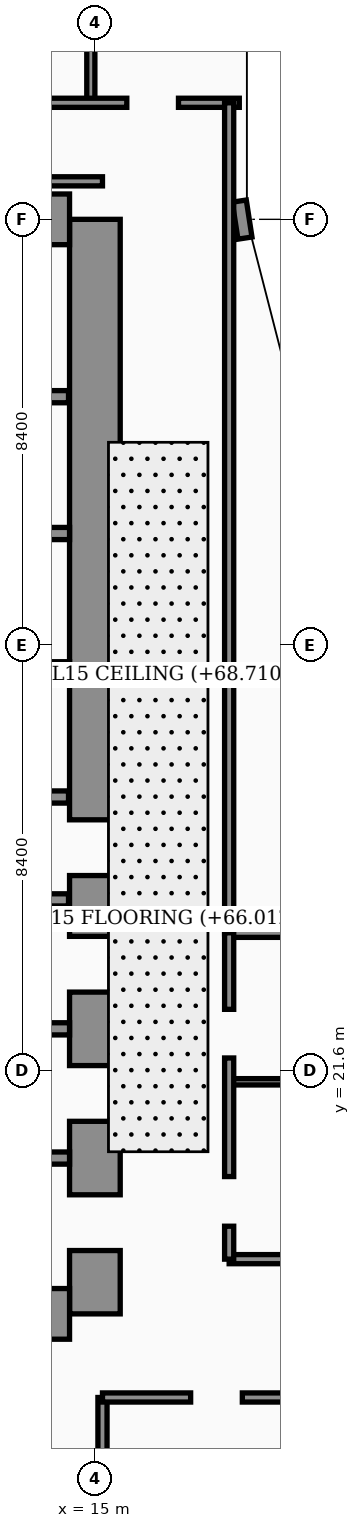
"""IFC4 building model, lengths in metres.
Left out: names, types, materials, properties, quantities, classifications, styles, units other than length and angle.
Written with IfcOpenShell. Run it as: python <this file> out.ifc"""

import sys

from ifc_helpers import new_model, si_unit, direction, frame, frame_2d, origin, place, context, subcontext, project, spatial, rectangle, extrude, element, fill, save


model = new_model("IFC4")
c1 = context("Model", 3, precision=1e-05, world=origin(), true_north=direction((0.0, 1.0)))
c2 = subcontext(c1, "Body", "Model", "MODEL_VIEW")
j1 = project(units=[si_unit("LENGTHUNIT", "METRE"), si_unit("PLANEANGLEUNIT", "RADIAN")], contexts=[c1])
p1 = place(None, origin())
s1 = spatial("IfcSite", under=j1, at=p1, CompositionType="ELEMENT")
p2 = place(p1, origin())
s2 = spatial("IfcBuilding", under=s1, at=p2, CompositionType="ELEMENT")
p3 = place(p2, frame((0.0, 0.0, 66.0)))
s3 = spatial("IfcBuildingStorey", under=s2, at=p3, CompositionType="ELEMENT", Elevation=66.0)
p4 = place(p3, frame((15.0, 16.8, 0.0), z_axis=(0.0, 0.0, 1.0), x_axis=(0.0, 1.0, 0.0)))
e1 = element("IfcWall", 1, at=p4, inside=s3, PredefinedType="SHEAR", context=c2, shape_type="SweptSolid", body=[
    extrude(rectangle(XDim=21.6, YDim=1.0, at=frame_2d((10.8, 0.0))), origin(), (0.0, 0.0, 1.0), 3.56),
])
p5 = place(p4, frame((8.65, 0.0, 0.0)))
e2 = element("IfcOpeningElement", 2, at=p5, cuts=e1, PredefinedType="OPENING", context=c2, shape_type="SweptSolid", body=[
    extrude(rectangle(XDim=1.1, YDim=2.2, at=frame_2d((0.55, 1.1))), frame((0.0, 0.51, 0.0), z_axis=(0.0, -1.0, 0.0), x_axis=(1.0, 0.0, 0.0)), (0.0, 0.0, 1.0), 1.02),
])
p6 = place(p4, frame((1.25, 0.0, 0.0)))
e3 = element("IfcOpeningElement", 3, at=p6, cuts=e1, PredefinedType="OPENING", context=c2, shape_type="SweptSolid", body=[
    extrude(rectangle(XDim=1.1, YDim=2.2, at=frame_2d((0.55, 1.1))), frame((0.0, 0.51, 0.0), z_axis=(0.0, -1.0, 0.0), x_axis=(1.0, 0.0, 0.0)), (0.0, 0.0, 1.0), 1.02),
])
p7 = place(p4, frame((3.8, 0.0, 0.0)))
e4 = element("IfcOpeningElement", 4, at=p7, cuts=e1, PredefinedType="OPENING", context=c2, shape_type="SweptSolid", body=[
    extrude(rectangle(XDim=1.1, YDim=2.2, at=frame_2d((0.55, 1.1))), frame((0.0, 0.51, 0.0), z_axis=(0.0, -1.0, 0.0), x_axis=(1.0, 0.0, 0.0)), (0.0, 0.0, 1.0), 1.02),
])
p8 = place(p4, frame((6.35, 0.0, 0.0)))
e5 = element("IfcOpeningElement", 5, at=p8, cuts=e1, PredefinedType="OPENING", context=c2, shape_type="SweptSolid", body=[
    extrude(rectangle(XDim=1.1, YDim=2.2, at=frame_2d((0.55, 1.1))), frame((0.0, 0.51, 0.0), z_axis=(0.0, -1.0, 0.0), x_axis=(1.0, 0.0, 0.0)), (0.0, 0.0, 1.0), 1.02),
])
for number, where, z_axis, x_axis in (
    (6, (4.7, 38.4, 0.0), (0.0, 0.0, 1.0), (1.0, 0.0, 0.0)),
    (7, (4.7, 16.8, 0.0), (0.0, 0.0, 1.0), (1.0, 0.0, 0.0)),
):
    element("IfcWall", number, at=place(p3, frame(where, z_axis=z_axis, x_axis=x_axis)), inside=s3, PredefinedType="SHEAR", context=c2, shape_type="SweptSolid", body=[
        extrude(rectangle(XDim=9.8, YDim=1.0, at=frame_2d((4.9, 0.0))), origin(), (0.0, 0.0, 1.0), 3.56),
    ])
for number, where, z_axis, x_axis in (
    (8, (12.18, 19.875, 0.0), (0.0, 0.0, 1.0), (1.0, 0.0, 0.0)),
    (9, (12.18, 22.425, 0.0), (0.0, 0.0, 1.0), (1.0, 0.0, 0.0)),
    (10, (12.18, 29.55, 0.0), (0.0, 0.0, 1.0), (1.0, 0.0, 0.0)),
    (11, (12.18, 32.2, 0.0), (0.0, 0.0, 1.0), (1.0, 0.0, 0.0)),
):
    element("IfcWall", number, at=place(p3, frame(where, z_axis=z_axis, x_axis=x_axis)), inside=s3, PredefinedType="SOLIDWALL", context=c2, shape_type="SweptSolid", body=[
        extrude(rectangle(XDim=2.32, YDim=0.24, at=frame_2d((1.16, 0.0))), origin(), (0.0, 0.0, 1.0), 3.56),
    ])
p9 = place(p3, frame((17.962, 38.03, 0.0), z_axis=(0.0, 0.0, 1.0), x_axis=(-0.15141125477, 0.988470855377, 0.0)))
e12 = element("IfcWall", 12, at=p9, inside=s3, PredefinedType="SOLIDWALL", context=c2, shape_type="SweptSolid", body=[
    extrude(rectangle(XDim=0.739, YDim=0.28, at=frame_2d((0.369, 0.0))), origin(), (0.0, 0.0, 1.0), 3.56),
])
p10 = place(p3, frame((12.15, 24.97, 0.0), z_axis=(0.0, 0.0, 1.0), x_axis=(1.0, 0.0, 0.0)))
e13 = element("IfcWall", 13, at=p10, inside=s3, PredefinedType="SOLIDWALL", context=c2, shape_type="SweptSolid", body=[
    extrude(rectangle(XDim=2.33, YDim=0.24, at=frame_2d((1.165, 0.0))), origin(), (0.0, 0.0, 1.0), 2.84),
])
p11 = place(p3, frame((12.25, 27.0, 0.0), z_axis=(0.0, 0.0, 1.0), x_axis=(1.0, 0.0, 0.0)))
e14 = element("IfcWall", 14, at=p11, inside=s3, PredefinedType="SOLIDWALL", context=c2, shape_type="SweptSolid", body=[
    extrude(rectangle(XDim=2.23, YDim=0.24, at=frame_2d((1.115, 0.0))), origin(), (0.0, 0.0, 1.0), 3.56),
])
p12 = place(p3, frame((9.66, 34.9, 0.0), z_axis=(0.0, 0.0, 1.0), x_axis=(1.0, 0.0, 0.0)))
e15 = element("IfcWall", 15, at=p12, inside=s3, PredefinedType="SOLIDWALL", context=c2, shape_type="SweptSolid", body=[
    extrude(rectangle(XDim=4.82, YDim=0.24, at=frame_2d((2.41, 0.0))), origin(), (0.0, 0.0, 1.0), 3.56),
])
p13 = place(p3, frame((15.15, 2.44, 0.0), z_axis=(0.0, 0.0, 1.0), x_axis=(0.0, 1.0, 0.0)))
e16 = element("IfcWall", 16, at=p13, inside=s3, PredefinedType="PARTITIONING", context=c2, shape_type="SweptSolid", body=[
    extrude(rectangle(XDim=12.71, YDim=0.18, at=frame_2d((6.355, 0.0))), origin(), (0.0, 0.0, 1.0), 3.04),
])
p14 = place(p3, frame((15.15, 15.15, 0.0), z_axis=(0.0, 0.0, 1.0), x_axis=(1.0, 0.0, 0.0)))
e17 = element("IfcWall", 17, at=p14, inside=s3, PredefinedType="PARTITIONING", context=c2, shape_type="SweptSolid", body=[
    extrude(rectangle(XDim=6.45, YDim=0.18, at=frame_2d((3.225, 0.0))), origin(), (0.0, 0.0, 1.0), 2.34),
])
p15 = place(p14, frame((1.74, 0.0, 0.0)))
e18 = element("IfcOpeningElement", 18, at=p15, cuts=e17, PredefinedType="OPENING", context=c2, shape_type="SweptSolid", body=[
    extrude(rectangle(XDim=1.02, YDim=2.2, at=frame_2d((0.51, 1.1))), frame((0.0, 0.1, 0.0), z_axis=(0.0, -1.0, 0.0), x_axis=(1.0, 0.0, 0.0)), (0.0, 0.0, 1.0), 0.2),
])
p16 = place(p3, frame((14.92, 40.7, 0.0), z_axis=(0.0, 0.0, 1.0), x_axis=(0.0, 1.0, 0.0)))
e19 = element("IfcWall", 19, at=p16, inside=s3, PredefinedType="PARTITIONING", context=c2, shape_type="SweptSolid", body=[
    extrude(rectangle(XDim=7.1, YDim=0.16, at=frame_2d((3.55, 0.0))), origin(), (0.0, 0.0, 1.0), 3.04),
])
p17 = place(p3, frame((0.08, 40.7, 0.0), z_axis=(0.0, 0.0, 1.0), x_axis=(1.0, 0.0, 0.0)))
e20 = element("IfcWall", 20, at=p17, inside=s3, PredefinedType="PARTITIONING", context=c2, shape_type="SweptSolid", body=[
    extrude(rectangle(XDim=17.77, YDim=0.18, at=frame_2d((8.885, 0.0))), origin(), (0.0, 0.0, 1.0), 2.84),
])
p18 = place(p17, frame((0.9, 0.0, 0.0)))
e21 = element("IfcOpeningElement", 21, at=p18, cuts=e20, PredefinedType="OPENING", context=c2, shape_type="SweptSolid", body=[
    extrude(rectangle(XDim=1.02, YDim=2.2, at=frame_2d((0.51, 1.1))), frame((0.0, 0.1, 0.0), z_axis=(0.0, -1.0, 0.0), x_axis=(1.0, 0.0, 0.0)), (0.0, 0.0, 1.0), 0.2),
])
p19 = place(p17, frame((4.75, 0.0, 0.0)))
e22 = element("IfcOpeningElement", 22, at=p19, cuts=e20, PredefinedType="OPENING", context=c2, shape_type="SweptSolid", body=[
    extrude(rectangle(XDim=1.02, YDim=2.2, at=frame_2d((0.51, 1.1))), frame((0.0, 0.1, 0.0), z_axis=(0.0, -1.0, 0.0), x_axis=(1.0, 0.0, 0.0)), (0.0, 0.0, 1.0), 0.2),
])
p20 = place(p17, frame((10.63, 0.0, 0.0)))
e23 = element("IfcOpeningElement", 23, at=p20, cuts=e20, PredefinedType="OPENING", context=c2, shape_type="SweptSolid", body=[
    extrude(rectangle(XDim=1.02, YDim=2.2, at=frame_2d((0.51, 1.1))), frame((0.0, 0.1, 0.0), z_axis=(0.0, -1.0, 0.0), x_axis=(1.0, 0.0, 0.0)), (0.0, 0.0, 1.0), 0.2),
])
p21 = place(p17, frame((15.55, 0.0, 0.0)))
e24 = element("IfcOpeningElement", 24, at=p21, cuts=e20, PredefinedType="OPENING", context=c2, shape_type="SweptSolid", body=[
    extrude(rectangle(XDim=1.02, YDim=2.2, at=frame_2d((0.51, 1.1))), frame((0.0, 0.1, 0.0), z_axis=(0.0, -1.0, 0.0), x_axis=(1.0, 0.0, 0.0)), (0.0, 0.0, 1.0), 0.2),
])
p22 = place(p3, frame((17.65, 24.3, 0.0), z_axis=(0.0, 0.0, 1.0), x_axis=(0.0, 1.0, 0.0)))
e25 = element("IfcWall", 25, at=p22, inside=s3, PredefinedType="PARTITIONING", context=c2, shape_type="SweptSolid", body=[
    extrude(rectangle(XDim=16.4, YDim=0.18, at=frame_2d((8.2, 0.0))), origin(), (0.0, 0.0, 1.0), 2.84),
])
p23 = place(p3, frame((3.68, 39.15, 0.0), z_axis=(0.0, 0.0, 1.0), x_axis=(1.0, 0.0, 0.0)))
e26 = element("IfcWall", 26, at=p23, inside=s3, PredefinedType="PARTITIONING", context=c2, shape_type="SweptSolid", body=[
    extrude(rectangle(XDim=11.47, YDim=0.18, at=frame_2d((5.735, 0.0))), origin(), (0.0, 0.0, 1.0), 2.84),
])
p24 = place(p3, frame((17.65, 17.88, 0.0), z_axis=(0.0, 0.0, 1.0), x_axis=(1.0, 0.0, 0.0)))
e27 = element("IfcWall", 27, at=p24, inside=s3, PredefinedType="PARTITIONING", context=c2, shape_type="SweptSolid", body=[
    extrude(rectangle(XDim=3.9, YDim=0.18, at=frame_2d((1.95, 0.0))), origin(), (0.0, 0.0, 1.0), 3.56),
])
p25 = place(p3, frame((17.65, 21.38, 0.0), z_axis=(0.0, 0.0, 1.0), x_axis=(1.0, 0.0, 0.0)))
e28 = element("IfcWall", 28, at=p25, inside=s3, PredefinedType="PARTITIONING", context=c2, shape_type="SweptSolid", body=[
    extrude(rectangle(XDim=3.9, YDim=0.125, at=frame_2d((1.95, 0.0))), origin(), (0.0, 0.0, 1.0), 3.09),
])
p26 = place(p3, frame((17.65, 24.32, 0.0), z_axis=(0.0, 0.0, 1.0), x_axis=(1.0, 0.0, 0.0)))
e29 = element("IfcWall", 29, at=p26, inside=s3, PredefinedType="PARTITIONING", context=c2, shape_type="SweptSolid", body=[
    extrude(rectangle(XDim=3.95, YDim=0.18, at=frame_2d((1.975, 0.0))), origin(), (0.0, 0.0, 1.0), 3.56),
])
p27 = place(p3, frame((17.65, 17.88, 0.0), z_axis=(0.0, 0.0, 1.0), x_axis=(0.0, 1.0, 0.0)))
e30 = element("IfcWall", 30, at=p27, inside=s3, PredefinedType="PARTITIONING", context=c2, shape_type="SweptSolid", body=[
    extrude(rectangle(XDim=6.44, YDim=0.18, at=frame_2d((3.22, 0.0))), origin(), (0.0, 0.0, 1.0), 3.09),
])
p28 = place(p27, frame((0.65, 0.0, 0.0)))
e31 = element("IfcOpeningElement", 31, at=p28, cuts=e30, PredefinedType="OPENING", context=c2, shape_type="SweptSolid", body=[
    extrude(rectangle(XDim=0.98, YDim=2.15, at=frame_2d((0.49, 1.075))), frame((0.0, 0.1, 0.0), z_axis=(0.0, -1.0, 0.0), x_axis=(1.0, 0.0, 0.0)), (0.0, 0.0, 1.0), 0.2),
])
p29 = place(p27, frame((3.97, 0.0, 0.0)))
e32 = element("IfcOpeningElement", 32, at=p29, cuts=e30, PredefinedType="OPENING", context=c2, shape_type="SweptSolid", body=[
    extrude(rectangle(XDim=0.96, YDim=2.2, at=frame_2d((0.48, 1.1))), frame((0.0, 0.1, 0.0), z_axis=(0.0, -1.0, 0.0), x_axis=(1.0, 0.0, 0.0)), (0.0, 0.0, 1.0), 0.2),
])
p30 = place(p15, origin())
e33 = element("IfcDoor", 33, at=p30, inside=s3, OperationType="SINGLE_SWING_LEFT", PredefinedType="DOOR", context=c2, shape_type="SweptSolid", body=[
    extrude(rectangle(XDim=1.02, YDim=2.2, at=frame_2d((0.51, 1.1))), frame((0.0, 0.025, 0.0), z_axis=(0.0, -1.0, 0.0), x_axis=(1.0, 0.0, 0.0)), (0.0, 0.0, 1.0), 0.05),
])
fill(e18, e33)
p31 = place(p21, origin())
e34 = element("IfcDoor", 34, at=p31, inside=s3, OperationType="SINGLE_SWING_RIGHT", PredefinedType="DOOR", context=c2, shape_type="SweptSolid", body=[
    extrude(rectangle(XDim=1.02, YDim=2.2, at=frame_2d((0.51, 1.1))), frame((0.0, 0.025, 0.0), z_axis=(0.0, -1.0, 0.0), x_axis=(1.0, 0.0, 0.0)), (0.0, 0.0, 1.0), 0.05),
])
fill(e24, e34)
p32 = place(p28, origin())
e35 = element("IfcDoor", 35, at=p32, inside=s3, OperationType="SINGLE_SWING_LEFT", PredefinedType="DOOR", context=c2, shape_type="SweptSolid", body=[
    extrude(rectangle(XDim=0.98, YDim=2.15, at=frame_2d((0.49, 1.075))), frame((0.0, 0.025, 0.0), z_axis=(0.0, -1.0, 0.0), x_axis=(1.0, 0.0, 0.0)), (0.0, 0.0, 1.0), 0.05),
])
fill(e31, e35)
p33 = place(p29, origin())
e36 = element("IfcDoor", 36, at=p33, inside=s3, OperationType="SINGLE_SWING_RIGHT", PredefinedType="DOOR", context=c2, shape_type="SweptSolid", body=[
    extrude(rectangle(XDim=0.96, YDim=2.2, at=frame_2d((0.48, 1.1))), frame((0.0, 0.025, 0.0), z_axis=(0.0, -1.0, 0.0), x_axis=(1.0, 0.0, 0.0)), (0.0, 0.0, 1.0), 0.05),
])
fill(e32, e36)
p34 = place(p5, origin())
e37 = element("IfcDoor", 37, at=p34, inside=s3, OperationType="SINGLE_SWING_RIGHT", PredefinedType="DOOR", context=c2, shape_type="SweptSolid", body=[
    extrude(rectangle(XDim=1.1, YDim=2.2, at=frame_2d((0.55, 1.1))), frame((0.0, 0.025, 0.0), z_axis=(0.0, -1.0, 0.0), x_axis=(1.0, 0.0, 0.0)), (0.0, 0.0, 1.0), 0.05),
])
fill(e2, e37)
p35 = place(p6, origin())
e38 = element("IfcDoor", 38, at=p35, inside=s3, OperationType="DOUBLE_DOOR_SLIDING", PredefinedType="DOOR", context=c2, shape_type="SweptSolid", body=[
    extrude(rectangle(XDim=1.1, YDim=2.2, at=frame_2d((0.55, 1.1))), frame((0.0, 0.025, 0.0), z_axis=(0.0, -1.0, 0.0), x_axis=(1.0, 0.0, 0.0)), (0.0, 0.0, 1.0), 0.05),
])
fill(e3, e38)
p36 = place(p7, origin())
e39 = element("IfcDoor", 39, at=p36, inside=s3, OperationType="DOUBLE_DOOR_SLIDING", PredefinedType="DOOR", context=c2, shape_type="SweptSolid", body=[
    extrude(rectangle(XDim=1.1, YDim=2.2, at=frame_2d((0.55, 1.1))), frame((0.0, 0.025, 0.0), z_axis=(0.0, -1.0, 0.0), x_axis=(1.0, 0.0, 0.0)), (0.0, 0.0, 1.0), 0.05),
])
fill(e4, e39)
p37 = place(p8, origin())
e40 = element("IfcDoor", 40, at=p37, inside=s3, OperationType="DOUBLE_DOOR_SLIDING", PredefinedType="DOOR", context=c2, shape_type="SweptSolid", body=[
    extrude(rectangle(XDim=1.1, YDim=2.2, at=frame_2d((0.55, 1.1))), frame((0.0, 0.025, 0.0), z_axis=(0.0, -1.0, 0.0), x_axis=(1.0, 0.0, 0.0)), (0.0, 0.0, 1.0), 0.05),
])
fill(e5, e40)
save(model, sys.argv[1])
